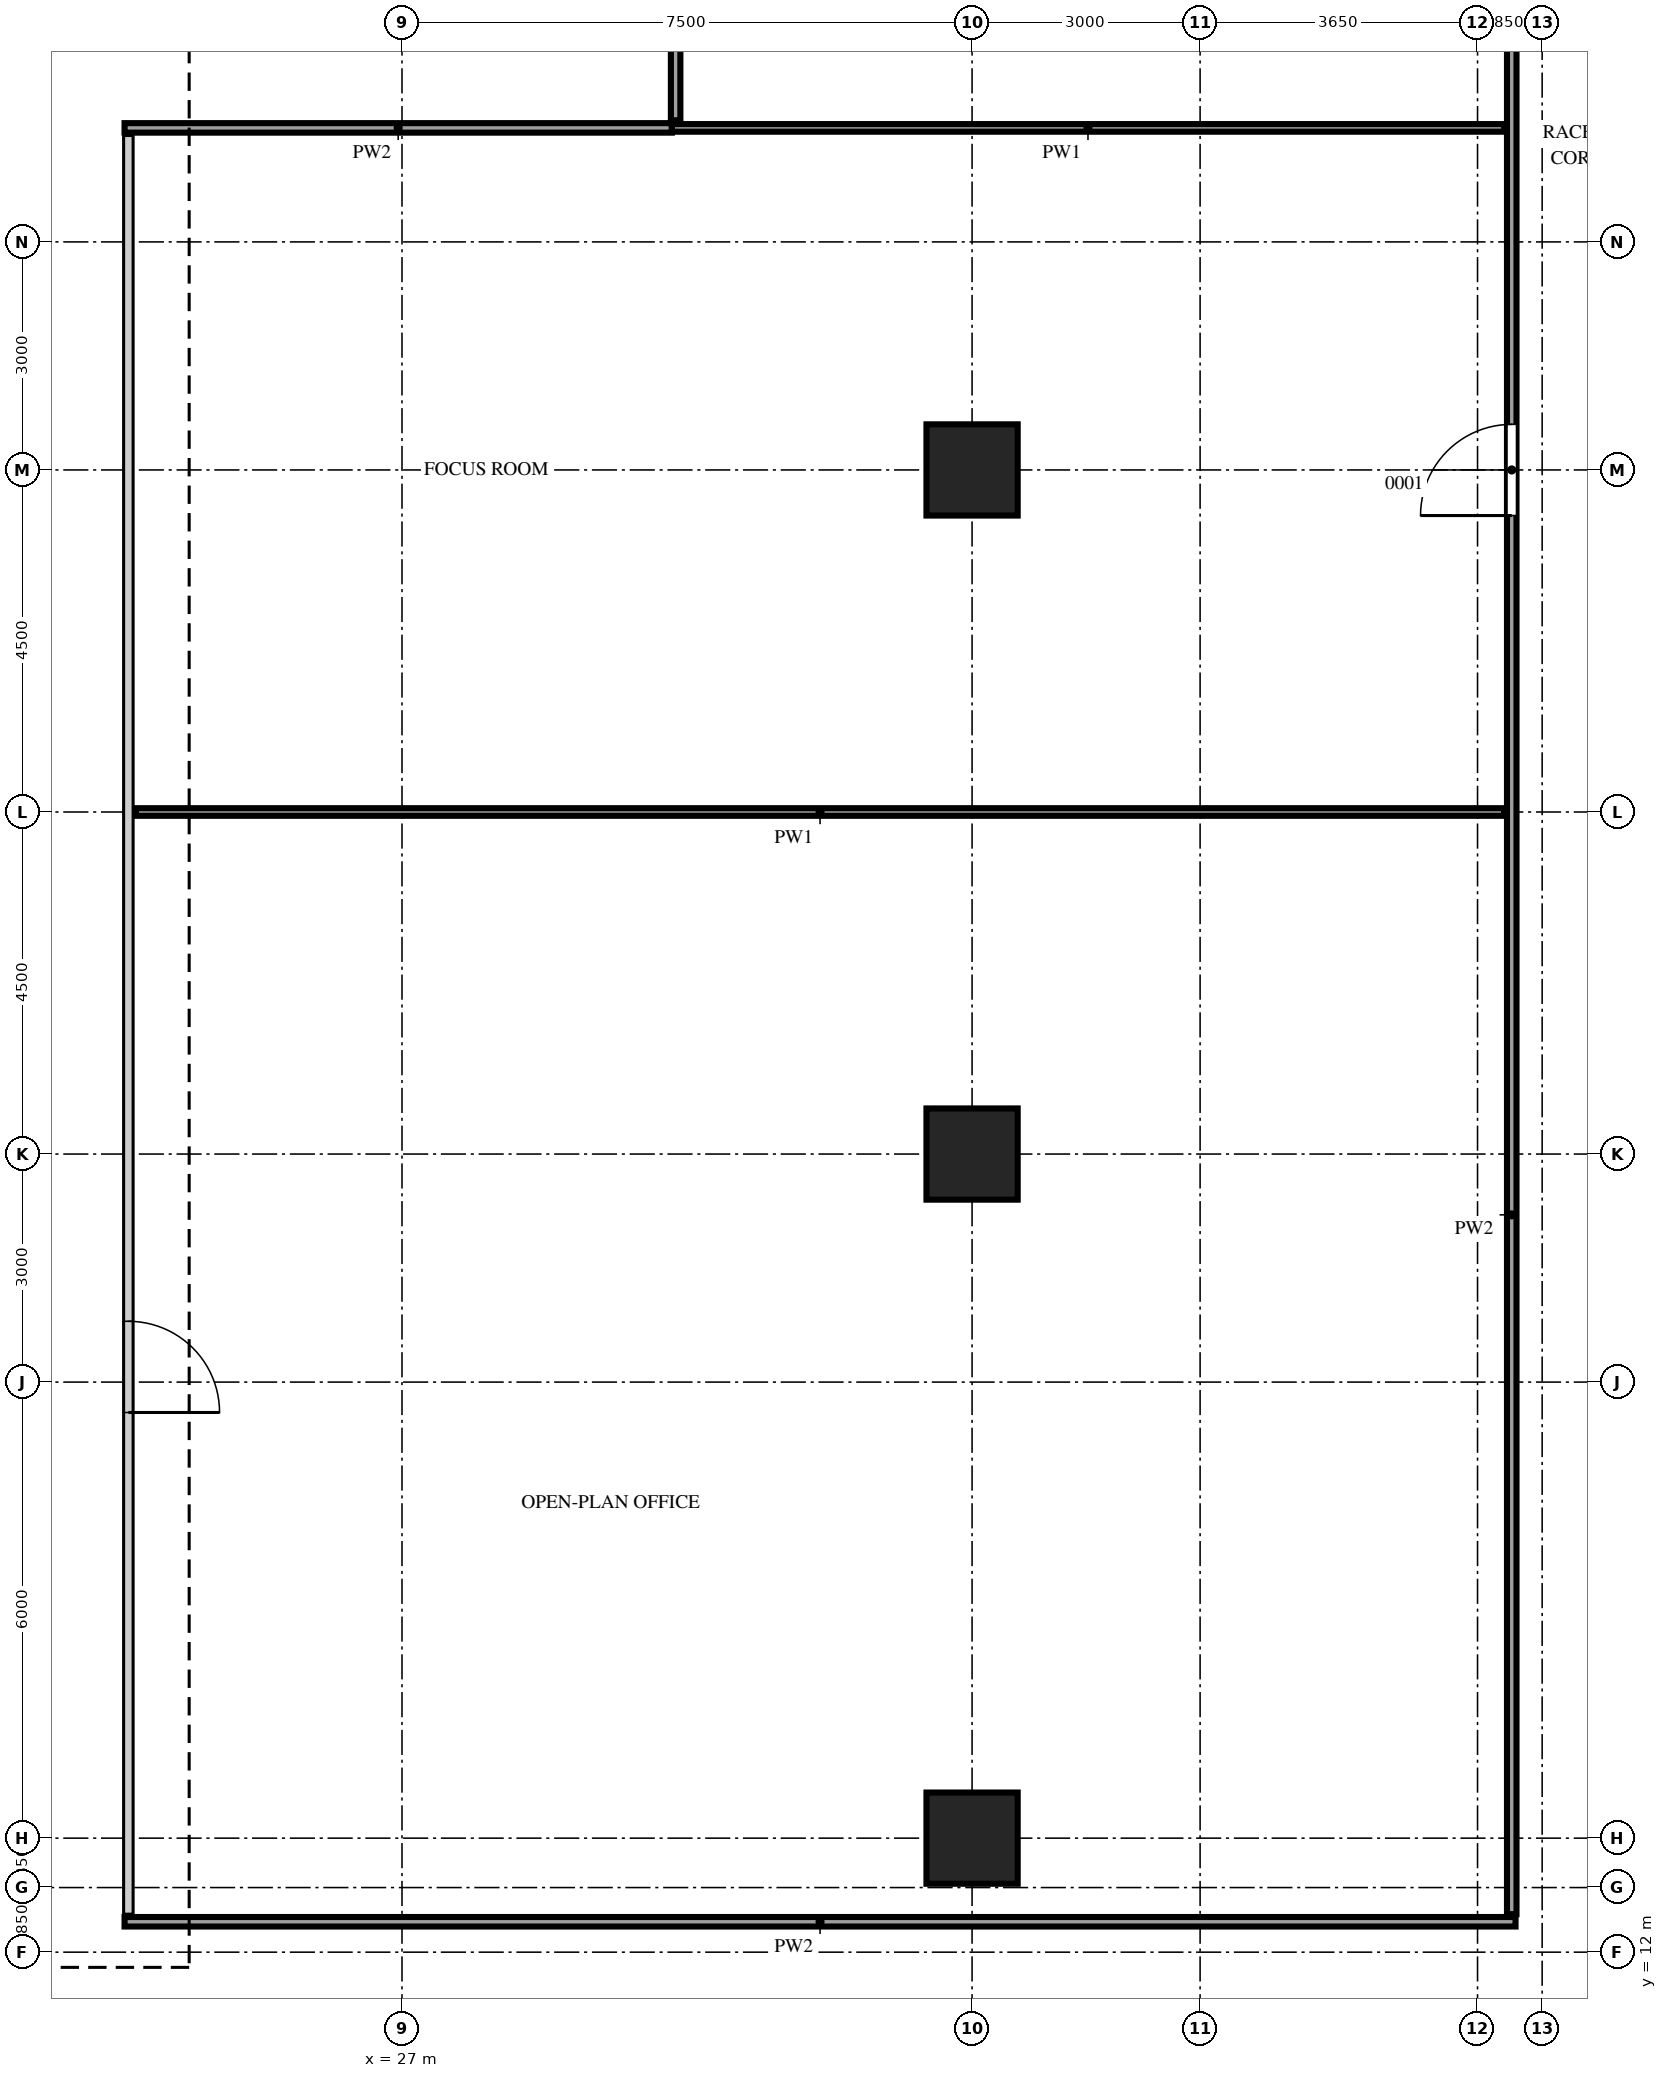
"""IFC4 building model, lengths in metres.
Left out: names, types, materials, properties, quantities, classifications, styles, units other than length and angle.
Written with IfcOpenShell. Run it as: python <this file> out.ifc"""

import sys

from ifc_helpers import new_model, si_unit, direction, frame, frame_2d, origin, origin_2d, place, context, subcontext, project, spatial, rectangle, extrude, source, transform, mapped, element, fill, save


model = new_model("IFC4")
c1 = context("Model", 3, precision=1e-05, world=origin(), true_north=direction((0.0, 1.0)))
c2 = subcontext(c1, "Body", "Model", "MODEL_VIEW")
j1 = project(units=[si_unit("LENGTHUNIT", "METRE"), si_unit("PLANEANGLEUNIT", "RADIAN")], contexts=[c1])
p1 = place(None, origin())
s1 = spatial("IfcSite", under=j1, at=p1, CompositionType="ELEMENT")
p2 = place(p1, origin())
s2 = spatial("IfcBuilding", under=s1, at=p2, CompositionType="ELEMENT")
p3 = place(p2, frame((0.0, 0.0, 188.7)))
s3 = spatial("IfcBuildingStorey", under=s2, at=p3, CompositionType="ELEMENT", Elevation=188.7)
m1 = source(origin(), c2, "Body", "SweptSolid", [
    extrude(rectangle(XDim=1.2, YDim=1.2, at=origin_2d()), origin(), (0.0, 0.0, 1.0), 3.75),
])
for number, where, z_axis, x_axis in (
    (1, (34.5, 13.5, 0.0), (0.0, 0.0, 1.0), (1.0, 0.0, 0.0)),
    (2, (34.5, 22.5, 0.0), (0.0, 0.0, 1.0), (1.0, 0.0, 0.0)),
    (3, (34.5, 31.5, 0.0), (0.0, 0.0, 1.0), (1.0, 0.0, 0.0)),
):
    element("IfcColumn", number, at=place(p3, frame(where, z_axis=z_axis, x_axis=x_axis)), inside=s3, PredefinedType="COLUMN", context=c2, shape_type="MappedRepresentation", body=[
        mapped(m1, transform((0.0, 0.0, 0.0))),
    ])
m2 = source(origin(), c2, "Body", "SweptSolid", [
    extrude(rectangle(XDim=18.3, YDim=0.125, at=frame_2d((9.15, 0.0))), origin(), (0.0, 0.0, 1.0), 3.8),
])
p4 = place(p3, frame((23.35, 12.4, 0.0), z_axis=(0.0, 0.0, 1.0), x_axis=(1.0, 0.0, 0.0)))
e4 = element("IfcWall", 4, at=p4, inside=s3, PredefinedType="PARTITIONING", context=c2, shape_type="MappedRepresentation", body=[
    mapped(m2, transform((0.0, 0.0, 0.0))),
])
m3 = source(origin(), c2, "Body", "SweptSolid", [
    extrude(rectangle(XDim=23.4, YDim=0.125, at=frame_2d((11.7, 0.0))), origin(), (0.0, 0.0, 1.0), 3.8),
])
p5 = place(p3, frame((23.4, 12.5, 0.0), z_axis=(0.0, 0.0, 1.0), x_axis=(0.0, 1.0, 0.0)))
e5 = element("IfcWall", 5, at=p5, inside=s3, PredefinedType="PARTITIONING", context=c2, shape_type="MappedRepresentation", body=[
    mapped(m3, transform((0.0, 0.0, 0.0))),
])
m4 = source(origin(), c2, "Body", "SweptSolid", [
    extrude(rectangle(XDim=1.2, YDim=2.1, at=frame_2d((0.6, 1.05))), frame((0.0, 0.073, 0.0), z_axis=(0.0, -1.0, 0.0), x_axis=(1.0, 0.0, 0.0)), (0.0, 0.0, 1.0), 0.145),
])
p6 = place(p5, frame((6.6, 0.0, 0.0)))
e6 = element("IfcOpeningElement", 6, at=p6, cuts=e5, PredefinedType="OPENING", context=c2, shape_type="MappedRepresentation", body=[
    mapped(m4, transform((0.0, 0.0, 0.0))),
])
m5 = source(origin(), c2, "Body", "SweptSolid", [
    extrude(rectangle(XDim=29.0, YDim=0.125, at=frame_2d((14.5, 0.0))), origin(), (0.0, 0.0, 1.0), 3.8),
])
p7 = place(p3, frame((41.6, 12.5, 0.0), z_axis=(0.0, 0.0, 1.0), x_axis=(0.0, 1.0, 0.0)))
e7 = element("IfcWall", 7, at=p7, inside=s3, PredefinedType="PARTITIONING", context=c2, shape_type="MappedRepresentation", body=[
    mapped(m5, transform((0.0, 0.0, 0.0))),
])
p8 = place(p7, frame((18.4, 0.0, 0.0)))
e8 = element("IfcOpeningElement", 8, at=p8, cuts=e7, PredefinedType="OPENING", context=c2, shape_type="MappedRepresentation", body=[
    mapped(m4, transform((0.0, 0.0, 0.0))),
])
m6 = source(origin(), c2, "Body", "SweptSolid", [
    extrude(rectangle(XDim=18.0, YDim=0.1, at=frame_2d((9.0, 0.0))), origin(), (0.0, 0.0, 1.0), 3.8),
])
p9 = place(p3, frame((23.5, 27.0, 0.0), z_axis=(0.0, 0.0, 1.0), x_axis=(1.0, 0.0, 0.0)))
e9 = element("IfcWall", 9, at=p9, inside=s3, PredefinedType="PARTITIONING", context=c2, shape_type="MappedRepresentation", body=[
    mapped(m6, transform((0.0, 0.0, 0.0))),
])
m7 = source(origin(), c2, "Body", "SweptSolid", [
    extrude(rectangle(XDim=7.2, YDim=0.125, at=frame_2d((3.6, 0.0))), origin(), (0.0, 0.0, 1.0), 3.8),
])
p10 = place(p3, frame((23.35, 36.0, 0.0), z_axis=(0.0, 0.0, 1.0), x_axis=(1.0, 0.0, 0.0)))
e10 = element("IfcWall", 10, at=p10, inside=s3, PredefinedType="PARTITIONING", context=c2, shape_type="MappedRepresentation", body=[
    mapped(m7, transform((0.0, 0.0, 0.0))),
])
m8 = source(origin(), c2, "Body", "SweptSolid", [
    extrude(rectangle(XDim=10.95, YDim=0.1, at=frame_2d((5.475, 0.0))), origin(), (0.0, 0.0, 1.0), 3.8),
])
p11 = place(p3, frame((30.55, 36.0, 0.0), z_axis=(0.0, 0.0, 1.0), x_axis=(1.0, 0.0, 0.0)))
e11 = element("IfcWall", 11, at=p11, inside=s3, PredefinedType="PARTITIONING", context=c2, shape_type="MappedRepresentation", body=[
    mapped(m8, transform((0.0, 0.0, 0.0))),
])
m9 = source(origin(), c2, "Body", "SweptSolid", [
    extrude(rectangle(XDim=5.4, YDim=0.125, at=frame_2d((2.7, 0.0))), origin(), (0.0, 0.0, 1.0), 3.8),
])
p12 = place(p3, frame((30.6, 36.1, 0.0), z_axis=(0.0, 0.0, 1.0), x_axis=(0.0, 1.0, 0.0)))
e12 = element("IfcWall", 12, at=p12, inside=s3, PredefinedType="PARTITIONING", context=c2, shape_type="MappedRepresentation", body=[
    mapped(m9, transform((0.0, 0.0, 0.0))),
])
m10 = source(origin(), c2, "Body", "SweptSolid", [
    extrude(rectangle(XDim=1.2, YDim=2.1, at=frame_2d((0.6, 1.05))), frame((0.0, 0.025, 0.0), z_axis=(0.0, -1.0, 0.0), x_axis=(1.0, 0.0, 0.0)), (0.0, 0.0, 1.0), 0.05),
])
p13 = place(p6, origin())
e13 = element("IfcDoor", 13, at=p13, inside=s3, OperationType="SINGLE_SWING_LEFT", PredefinedType="DOOR", context=c2, shape_type="MappedRepresentation", body=[
    mapped(m10, transform((0.0, 0.0, 0.0))),
])
fill(e6, e13)
p14 = place(p8, origin())
e14 = element("IfcDoor", 14, at=p14, inside=s3, OperationType="SINGLE_SWING_RIGHT", PredefinedType="DOOR", context=c2, shape_type="MappedRepresentation", body=[
    mapped(m10, transform((0.0, 0.0, 0.0))),
])
fill(e8, e14)
save(model, sys.argv[1])
